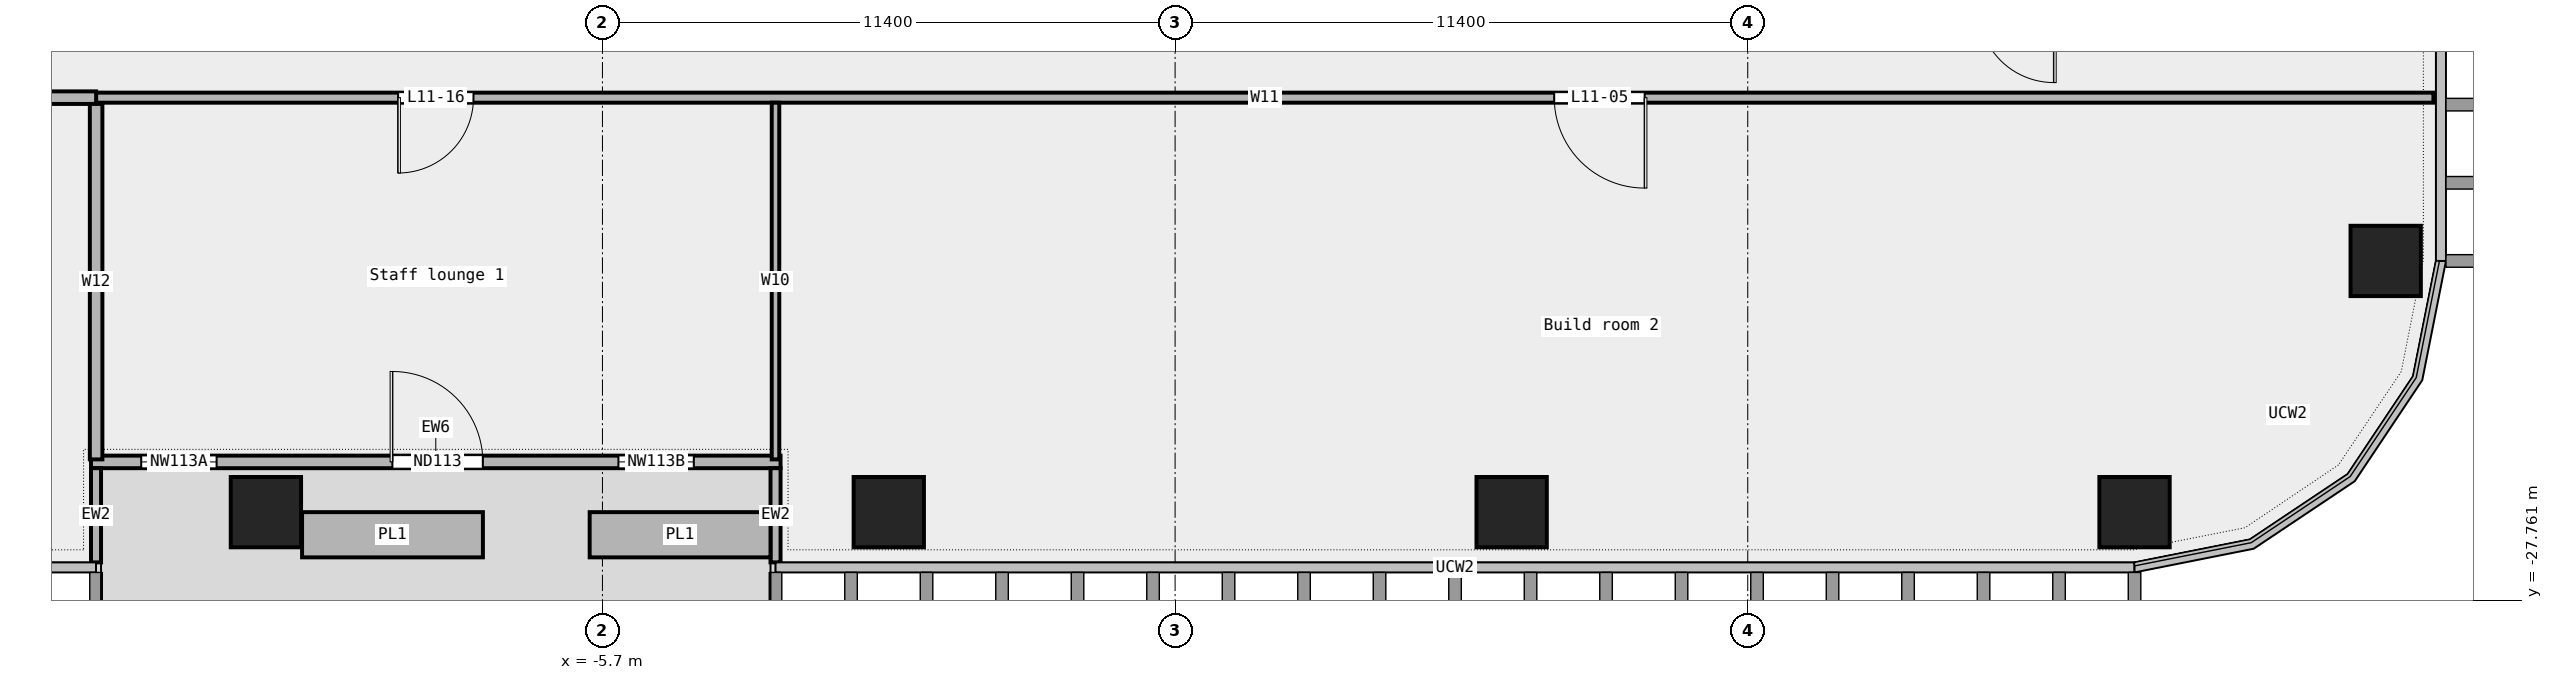
"""IFC4 building model, lengths in metres.
Left out: names, types, materials, properties, quantities, classifications, styles, units other than length and angle.
Written with IfcOpenShell. Run it as: python <this file> out.ifc"""

import sys

from ifc_helpers import new_model, si_unit, direction, frame, frame_2d, origin, origin_2d, place, context, subcontext, project, spatial, rectangle, extrude, element, fill, save


model = new_model("IFC4")
c1 = context("Model", 3, precision=1e-05, world=origin(), true_north=direction((0.0, 1.0)))
c2 = subcontext(c1, "Body", "Model", "MODEL_VIEW")
j1 = project(units=[si_unit("LENGTHUNIT", "METRE"), si_unit("PLANEANGLEUNIT", "RADIAN")], contexts=[c1])
p1 = place(None, origin())
s1 = spatial("IfcSite", under=j1, at=p1, CompositionType="ELEMENT")
p2 = place(p1, origin())
s2 = spatial("IfcBuilding", under=s1, at=p2, CompositionType="ELEMENT")
p3 = place(p2, frame((0.0, 0.0, 59.8)))
s3 = spatial("IfcBuildingStorey", under=s2, at=p3, CompositionType="ELEMENT", Elevation=59.8)
for number, where, z_axis, x_axis in (
    (1, (-12.4, -26.0, 0.0), (0.0, 0.0, 1.0), (1.0, 0.0, 0.0)),
    (2, (0.0, -26.0, 0.0), (0.0, 0.0, 1.0), (1.0, 0.0, 0.0)),
    (3, (12.4, -26.0, 0.0), (0.0, 0.0, 1.0), (1.0, 0.0, 0.0)),
    (4, (24.8, -26.0, 0.0), (0.0, 0.0, 1.0), (1.0, 0.0, 0.0)),
    (5, (29.8, -21.0, 0.0), (0.0, 0.0, 1.0), (1.0, 0.0, 0.0)),
):
    element("IfcColumn", number, at=place(p3, frame(where, z_axis=z_axis, x_axis=x_axis)), inside=s3, PredefinedType="COLUMN", context=c2, shape_type="SweptSolid", body=[
        extrude(rectangle(XDim=1.4, YDim=1.4, at=origin_2d()), origin(), (0.0, 0.0, 1.0), 4.35),
    ])
p4 = place(p3, frame((-15.882, -25.0, 0.0), z_axis=(0.0, 0.0, 1.0), x_axis=(1.0, 0.0, 0.0)))
e6 = element("IfcWall", 6, at=p4, inside=s3, PredefinedType="STANDARD", context=c2, shape_type="SweptSolid", body=[
    extrude(rectangle(XDim=13.727, YDim=0.25, at=frame_2d((6.864, 0.0))), origin(), (0.0, 0.0, 1.0), 4.35),
])
p5 = place(p4, frame((1.0, 0.0, 0.45)))
e7 = element("IfcOpeningElement", 7, at=p5, cuts=e6, PredefinedType="OPENING", context=c2, shape_type="SweptSolid", body=[
    extrude(rectangle(XDim=1.5, YDim=3.0, at=frame_2d((0.75, 1.5))), frame((0.0, 0.137, 0.0), z_axis=(0.0, -1.0, 0.0), x_axis=(1.0, 0.0, 0.0)), (0.0, 0.0, 1.0), 0.274),
])
p6 = place(p4, frame((6.0, 0.0, 0.0)))
e8 = element("IfcOpeningElement", 8, at=p6, cuts=e6, PredefinedType="OPENING", context=c2, shape_type="SweptSolid", body=[
    extrude(rectangle(XDim=1.8, YDim=2.4, at=frame_2d((0.9, 1.2))), frame((0.0, 0.137, 0.0), z_axis=(0.0, -1.0, 0.0), x_axis=(1.0, 0.0, 0.0)), (0.0, 0.0, 1.0), 0.274),
])
p7 = place(p4, frame((10.5, 0.0, 0.45)))
e9 = element("IfcOpeningElement", 9, at=p7, cuts=e6, PredefinedType="OPENING", context=c2, shape_type="SweptSolid", body=[
    extrude(rectangle(XDim=1.5, YDim=3.0, at=frame_2d((0.75, 1.5))), frame((0.0, 0.137, 0.0), z_axis=(0.0, -1.0, 0.0), x_axis=(1.0, 0.0, 0.0)), (0.0, 0.0, 1.0), 0.274),
])
for number, where, z_axis, x_axis in (
    (10, (-15.782, -27.0, 0.0), (0.0, 0.0, 1.0), (0.0, 1.0, 0.0)),
    (11, (-2.255, -27.0, 0.0), (0.0, 0.0, 1.0), (0.0, 1.0, 0.0)),
):
    element("IfcWall", number, at=place(p3, frame(where, z_axis=z_axis, x_axis=x_axis)), inside=s3, PredefinedType="STANDARD", context=c2, shape_type="SweptSolid", body=[
        extrude(rectangle(XDim=1.875, YDim=0.2, at=frame_2d((0.938, 0.0))), origin(), (0.0, 0.0, 1.0), 4.35),
    ])
for number, where, z_axis, x_axis in (
    (12, (-11.68, -26.45, 0.0), (0.0, 0.0, 1.0), (1.0, 0.0, 0.0)),
    (13, (-5.955, -26.45, 0.0), (0.0, 0.0, 1.0), (1.0, 0.0, 0.0)),
):
    element("IfcWall", number, at=place(p3, frame(where, z_axis=z_axis, x_axis=x_axis)), inside=s3, PredefinedType="STANDARD", context=c2, shape_type="SweptSolid", body=[
        extrude(rectangle(XDim=3.6, YDim=0.9, at=frame_2d((1.8, 0.0))), origin(), (0.0, 0.0, 1.0), 0.7),
    ])
p8 = place(p3, frame((-15.78, -17.75, 0.0), z_axis=(0.0, 0.0, 1.0), x_axis=(1.0, 0.0, 0.0)))
e14 = element("IfcWall", 14, at=p8, inside=s3, PredefinedType="PARTITIONING", context=c2, shape_type="SweptSolid", body=[
    extrude(rectangle(XDim=46.53, YDim=0.2, at=frame_2d((23.265, 0.0))), origin(), (0.0, 0.0, 1.0), 4.35),
])
p9 = place(p8, frame((29.028, 0.0, 0.0)))
e15 = element("IfcOpeningElement", 15, at=p9, cuts=e14, PredefinedType="OPENING", context=c2, shape_type="SweptSolid", body=[
    extrude(rectangle(XDim=1.8, YDim=2.1, at=frame_2d((0.9, 1.05))), frame((0.0, 0.112, 0.0), z_axis=(0.0, -1.0, 0.0), x_axis=(1.0, 0.0, 0.0)), (0.0, 0.0, 1.0), 0.224),
])
p10 = place(p8, frame((6.012, 0.0, 0.0)))
e16 = element("IfcOpeningElement", 16, at=p10, cuts=e14, PredefinedType="OPENING", context=c2, shape_type="SweptSolid", body=[
    extrude(rectangle(XDim=1.5, YDim=2.1, at=frame_2d((0.75, 1.05))), frame((0.0, 0.112, 0.0), z_axis=(0.0, -1.0, 0.0), x_axis=(1.0, 0.0, 0.0)), (0.0, 0.0, 1.0), 0.224),
])
p11 = place(p3, frame((-30.75, -17.75, 0.0), z_axis=(0.0, 0.0, 1.0), x_axis=(1.0, 0.0, 0.0)))
e17 = element("IfcWall", 17, at=p11, inside=s3, PredefinedType="PARTITIONING", context=c2, shape_type="SweptSolid", body=[
    extrude(rectangle(XDim=14.97, YDim=0.25, at=frame_2d((7.485, 0.0))), origin(), (0.0, 0.0, 1.0), 4.35),
])
p12 = place(p11, frame((6.685, 0.0, 0.0)))
e18 = element("IfcOpeningElement", 18, at=p12, cuts=e17, PredefinedType="OPENING", context=c2, shape_type="SweptSolid", body=[
    extrude(rectangle(XDim=1.8, YDim=2.1, at=frame_2d((0.9, 1.05))), frame((0.0, 0.137, 0.0), z_axis=(0.0, -1.0, 0.0), x_axis=(1.0, 0.0, 0.0)), (0.0, 0.0, 1.0), 0.274),
])
p13 = place(p3, frame((-15.78, -24.95, 0.0), z_axis=(0.0, 0.0, 1.0), x_axis=(0.0, 1.0, 0.0)))
e19 = element("IfcWall", 19, at=p13, inside=s3, PredefinedType="PARTITIONING", context=c2, shape_type="SweptSolid", body=[
    extrude(rectangle(XDim=7.075, YDim=0.25, at=frame_2d((3.538, 0.0))), origin(), (0.0, 0.0, 1.0), 4.35),
])
p14 = place(p3, frame((-2.255, -24.95, 0.0), z_axis=(0.0, 0.0, 1.0), x_axis=(0.0, 1.0, 0.0)))
e20 = element("IfcWall", 20, at=p14, inside=s3, PredefinedType="PARTITIONING", context=c2, shape_type="SweptSolid", body=[
    extrude(rectangle(XDim=7.1, YDim=0.15, at=frame_2d((3.55, 0.0))), origin(), (0.0, 0.0, 1.0), 4.35),
])
p15 = place(p5, origin())
e21 = element("IfcWindow", 21, at=p15, inside=s3, PartitioningType="SINGLE_PANEL", PredefinedType="WINDOW", context=c2, shape_type="SweptSolid", body=[
    extrude(rectangle(XDim=1.5, YDim=3.0, at=frame_2d((0.75, 1.5))), frame((0.0, 0.03, 0.0), z_axis=(0.0, -1.0, 0.0), x_axis=(1.0, 0.0, 0.0)), (0.0, 0.0, 1.0), 0.06),
])
fill(e7, e21)
p16 = place(p6, origin())
e22 = element("IfcDoor", 22, at=p16, inside=s3, OperationType="DOUBLE_DOOR_SINGLE_SWING", PredefinedType="DOOR", context=c2, shape_type="SweptSolid", body=[
    extrude(rectangle(XDim=1.8, YDim=2.4, at=frame_2d((0.9, 1.2))), frame((0.0, 0.025, 0.0), z_axis=(0.0, -1.0, 0.0), x_axis=(1.0, 0.0, 0.0)), (0.0, 0.0, 1.0), 0.05),
])
fill(e8, e22)
p17 = place(p7, origin())
e23 = element("IfcWindow", 23, at=p17, inside=s3, PartitioningType="SINGLE_PANEL", PredefinedType="WINDOW", context=c2, shape_type="SweptSolid", body=[
    extrude(rectangle(XDim=1.5, YDim=3.0, at=frame_2d((0.75, 1.5))), frame((0.0, 0.03, 0.0), z_axis=(0.0, -1.0, 0.0), x_axis=(1.0, 0.0, 0.0)), (0.0, 0.0, 1.0), 0.06),
])
fill(e9, e23)
p18 = place(p9, origin())
e24 = element("IfcDoor", 24, at=p18, inside=s3, OperationType="DOUBLE_DOOR_SINGLE_SWING", PredefinedType="DOOR", context=c2, shape_type="SweptSolid", body=[
    extrude(rectangle(XDim=1.8, YDim=2.1, at=frame_2d((0.9, 1.05))), frame((0.0, 0.025, 0.0), z_axis=(0.0, -1.0, 0.0), x_axis=(1.0, 0.0, 0.0)), (0.0, 0.0, 1.0), 0.05),
])
fill(e15, e24)
p19 = place(p10, origin())
e25 = element("IfcDoor", 25, at=p19, inside=s3, OperationType="DOUBLE_DOOR_SINGLE_SWING", PredefinedType="DOOR", context=c2, shape_type="SweptSolid", body=[
    extrude(rectangle(XDim=1.5, YDim=2.1, at=frame_2d((0.75, 1.05))), frame((0.0, 0.025, 0.0), z_axis=(0.0, -1.0, 0.0), x_axis=(1.0, 0.0, 0.0)), (0.0, 0.0, 1.0), 0.05),
])
fill(e16, e25)
save(model, sys.argv[1])
